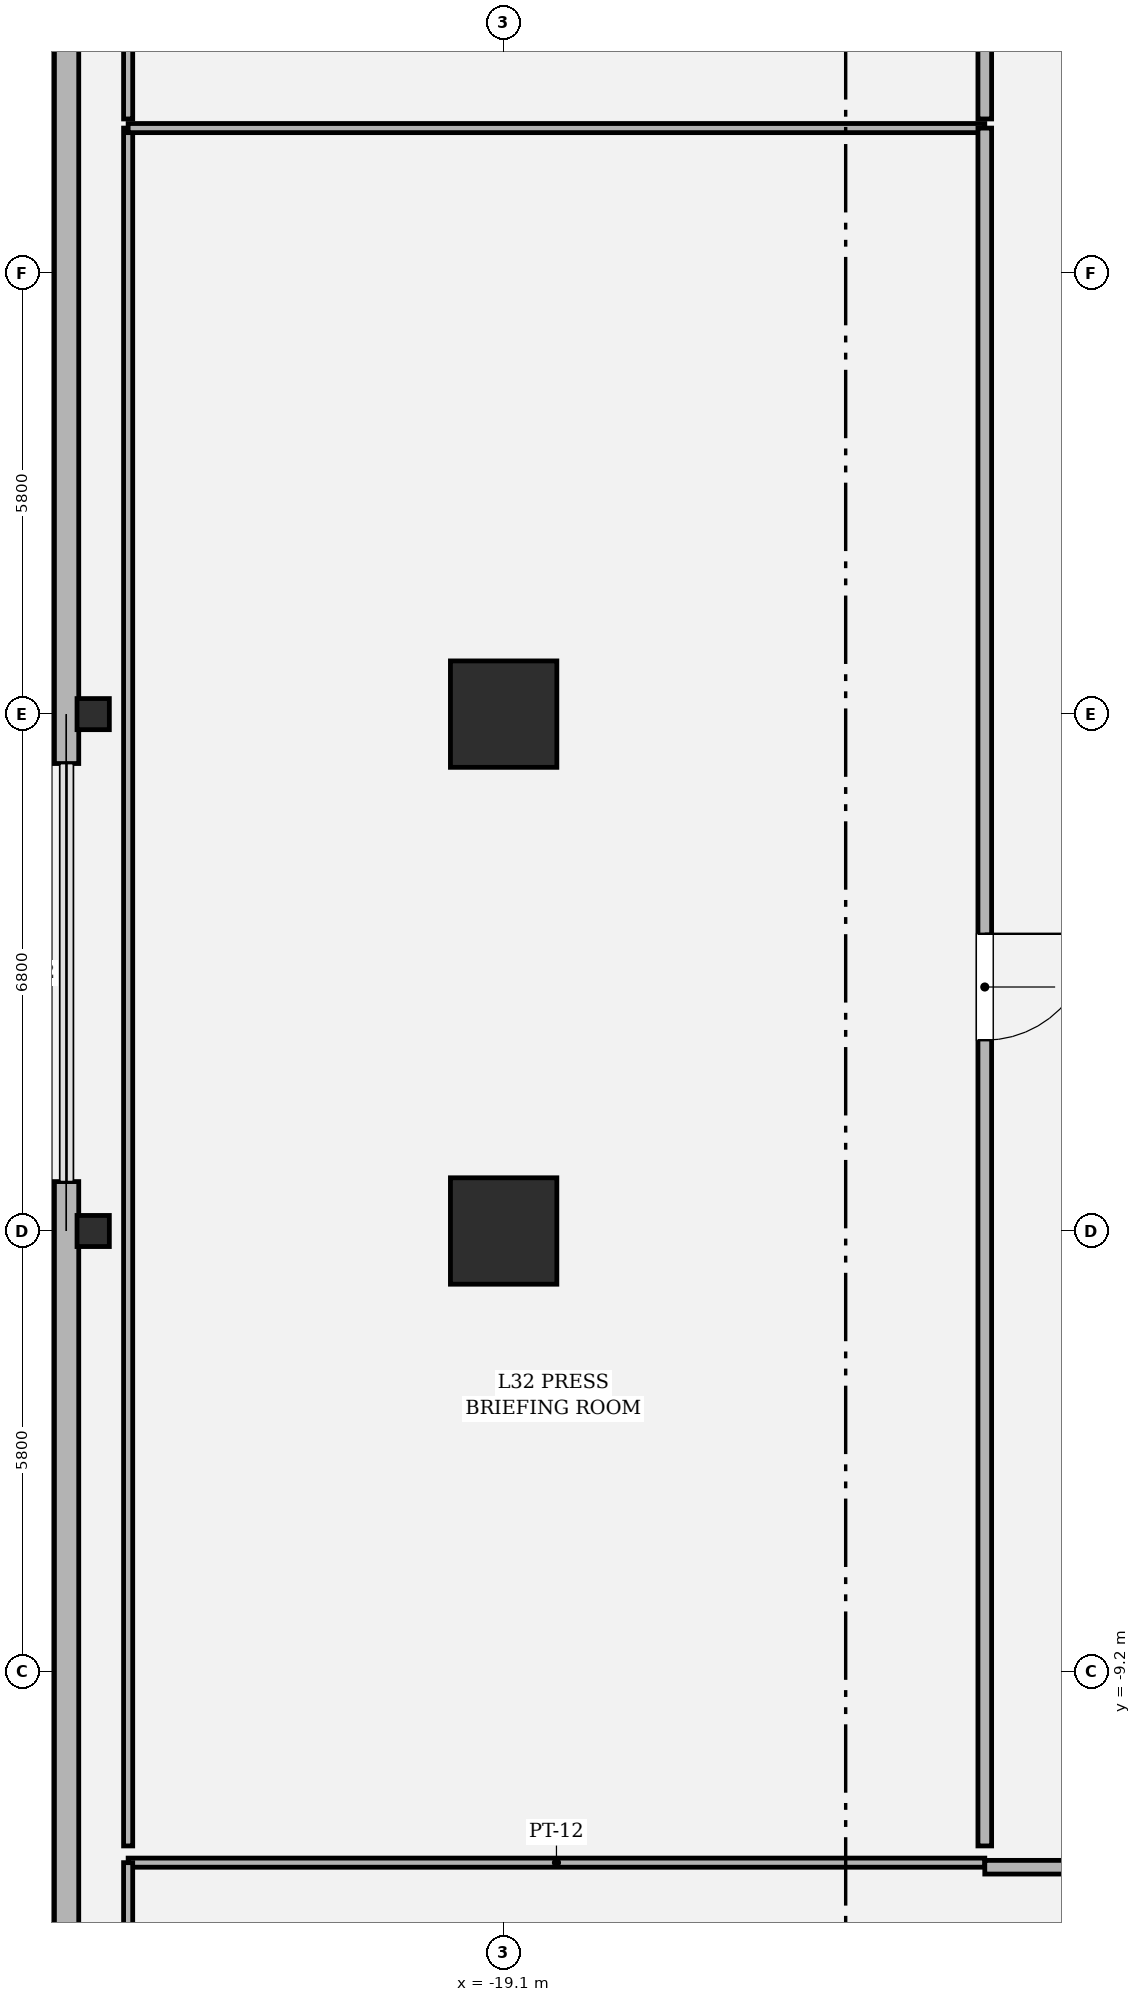
"""IFC4 building model, lengths in metres.
Left out: names, types, materials, properties, quantities, classifications, styles, units other than length and angle.
Written with IfcOpenShell. Run it as: python <this file> out.ifc"""

import sys

from ifc_helpers import new_model, si_unit, direction, frame, frame_2d, origin, origin_2d, place, context, subcontext, project, spatial, rectangle, hollow_rectangle, i_section, extrude, element, fill, save


model = new_model("IFC4")
c1 = context("Model", 3, precision=1e-05, world=origin(), true_north=direction((0.0, 1.0)))
c2 = subcontext(c1, "Body", "Model", "MODEL_VIEW")
j1 = project(units=[si_unit("LENGTHUNIT", "METRE"), si_unit("PLANEANGLEUNIT", "RADIAN")], contexts=[c1])
p1 = place(None, origin())
s1 = spatial("IfcSite", under=j1, at=p1, CompositionType="ELEMENT")
p2 = place(p1, origin())
s2 = spatial("IfcBuilding", under=s1, at=p2, CompositionType="ELEMENT")
p3 = place(p2, frame((0.0, 0.0, 139.8)))
s3 = spatial("IfcBuildingStorey", under=s2, at=p3, CompositionType="ELEMENT", Elevation=139.8)
for number, where, z_axis, x_axis in (
    (1, (-19.1, 3.4, 0.0), (0.0, 0.0, 1.0), (1.0, 0.0, 0.0)),
    (2, (-19.1, -3.4, 0.0), (0.0, 0.0, 1.0), (1.0, 0.0, 0.0)),
):
    element("IfcColumn", number, at=place(p3, frame(where, z_axis=z_axis, x_axis=x_axis)), inside=s3, PredefinedType="COLUMN", context=c2, shape_type="SweptSolid", body=[
        extrude(hollow_rectangle(XDim=1.4, YDim=1.4, WallThickness=0.042, at=origin_2d()), origin(), (0.0, 0.0, 1.0), 4.05),
    ])
for number, where, z_axis, x_axis in (
    (3, (-24.5, -3.4, 0.0), (0.0, 0.0, 1.0), (0.0, 1.0, 0.0)),
    (4, (-24.5, 3.4, 0.0), (0.0, 0.0, 1.0), (0.0, 1.0, 0.0)),
):
    element("IfcColumn", number, at=place(p3, frame(where, z_axis=z_axis, x_axis=x_axis)), inside=s3, PredefinedType="COLUMN", context=c2, shape_type="SweptSolid", body=[
        extrude(i_section(OverallWidth=0.409, OverallDepth=0.425, WebThickness=0.032, FlangeThickness=0.052, FilletRadius=0.018, at=origin_2d()), origin(), (0.0, 0.0, 1.0), 4.048),
    ])
p4 = place(p3, frame((-24.85, 20.237, 0.0), z_axis=(0.0, 0.0, 1.0), x_axis=(0.0, -1.0, 0.0)))
e5 = element("IfcWall", 5, at=p4, inside=s3, PredefinedType="SOLIDWALL", context=c2, shape_type="SweptSolid", body=[
    extrude(rectangle(XDim=17.487, YDim=0.32, at=frame_2d((8.743, 0.0))), origin(), (0.0, 0.0, 1.0), 2.544),
])
p5 = place(p3, frame((-24.85, -2.75, 0.0), z_axis=(0.0, 0.0, 1.0), x_axis=(0.0, -1.0, 0.0)))
e6 = element("IfcWall", 6, at=p5, inside=s3, PredefinedType="SOLIDWALL", context=c2, shape_type="SweptSolid", body=[
    extrude(rectangle(XDim=12.687, YDim=0.32, at=frame_2d((6.344, 0.0))), origin(), (0.0, 0.0, 1.0), 2.544),
])
p6 = place(p3, frame((-24.04, -11.71, 0.0), z_axis=(0.0, 0.0, 1.0), x_axis=(1.0, 0.0, 0.0)))
e7 = element("IfcWall", 7, at=p6, inside=s3, PredefinedType="PARTITIONING", context=c2, shape_type="SweptSolid", body=[
    extrude(rectangle(XDim=11.27, YDim=0.12, at=frame_2d((5.635, 0.0))), origin(), (0.0, 0.0, 1.0), 3.174),
])
p7 = place(p3, frame((-12.77, -11.77, 0.0), z_axis=(0.0, 0.0, 1.0), x_axis=(1.0, 0.0, 0.0)))
e8 = element("IfcWall", 8, at=p7, inside=s3, PredefinedType="PARTITIONING", context=c2, shape_type="SweptSolid", body=[
    extrude(rectangle(XDim=13.088, YDim=0.18, at=frame_2d((6.544, 0.0))), origin(), (0.0, 0.0, 1.0), 3.174),
])
p8 = place(p7, frame((6.019, 0.0, 0.0)))
e9 = element("IfcOpeningElement", 9, at=p8, cuts=e8, PredefinedType="OPENING", context=c2, shape_type="SweptSolid", body=[
    extrude(rectangle(XDim=1.05, YDim=2.2, at=frame_2d((0.525, 1.1))), frame((0.0, 0.1, 0.0), z_axis=(0.0, -1.0, 0.0), x_axis=(1.0, 0.0, 0.0)), (0.0, 0.0, 1.0), 0.2),
])
p9 = place(p3, frame((-24.04, -16.54, 0.0), z_axis=(0.0, 0.0, 1.0), x_axis=(0.0, 1.0, 0.0)))
e10 = element("IfcWall", 10, at=p9, inside=s3, PredefinedType="PARTITIONING", context=c2, shape_type="SweptSolid", body=[
    extrude(rectangle(XDim=4.83, YDim=0.12, at=frame_2d((2.415, 0.0))), origin(), (0.0, 0.0, 1.0), 3.83),
])
p10 = place(p3, frame((-24.04, -11.49, 0.0), z_axis=(0.0, 0.0, 1.0), x_axis=(0.0, 1.0, 0.0)))
e11 = element("IfcWall", 11, at=p10, inside=s3, PredefinedType="PARTITIONING", context=c2, shape_type="SweptSolid", body=[
    extrude(rectangle(XDim=22.6, YDim=0.12, at=frame_2d((11.3, 0.0))), origin(), (0.0, 0.0, 1.0), 2.504),
])
p11 = place(p3, frame((-24.04, 11.11, 0.0), z_axis=(0.0, 0.0, 1.0), x_axis=(1.0, 0.0, 0.0)))
e12 = element("IfcWall", 12, at=p11, inside=s3, PredefinedType="PARTITIONING", context=c2, shape_type="SweptSolid", body=[
    extrude(rectangle(XDim=11.27, YDim=0.12, at=frame_2d((5.635, 0.0))), origin(), (0.0, 0.0, 1.0), 3.174),
])
p12 = place(p3, frame((-12.77, 11.11, 0.0), z_axis=(0.0, 0.0, 1.0), x_axis=(0.0, -1.0, 0.0)))
e13 = element("IfcWall", 13, at=p12, inside=s3, PredefinedType="PARTITIONING", context=c2, shape_type="SweptSolid", body=[
    extrude(rectangle(XDim=22.6, YDim=0.18, at=frame_2d((11.3, 0.0))), origin(), (0.0, 0.0, 1.0), 3.174),
])
p13 = place(p12, frame((10.6, 0.0, 0.0)))
e14 = element("IfcOpeningElement", 14, at=p13, cuts=e13, PredefinedType="OPENING", context=c2, shape_type="SweptSolid", body=[
    extrude(rectangle(XDim=1.4, YDim=2.25, at=frame_2d((0.7, 1.125))), frame((0.0, 0.1, 0.0), z_axis=(0.0, -1.0, 0.0), x_axis=(1.0, 0.0, 0.0)), (0.0, 0.0, 1.0), 0.2),
])
p14 = place(p3, frame((-12.77, 22.44, 0.0), z_axis=(0.0, 0.0, 1.0), x_axis=(0.0, -1.0, 0.0)))
e15 = element("IfcWall", 15, at=p14, inside=s3, PredefinedType="PARTITIONING", context=c2, shape_type="SweptSolid", body=[
    extrude(rectangle(XDim=11.21, YDim=0.18, at=frame_2d((5.605, 0.0))), origin(), (0.0, 0.0, 1.0), 3.174),
])
p15 = place(p14, frame((5.08, 0.0, 0.0)))
e16 = element("IfcOpeningElement", 16, at=p15, cuts=e15, PredefinedType="OPENING", context=c2, shape_type="SweptSolid", body=[
    extrude(rectangle(XDim=1.05, YDim=2.2, at=frame_2d((0.525, 1.1))), frame((0.0, 0.1, 0.0), z_axis=(0.0, -1.0, 0.0), x_axis=(1.0, 0.0, 0.0)), (0.0, 0.0, 1.0), 0.2),
])
p16 = place(p3, frame((-24.04, 11.23, 0.0), z_axis=(0.0, 0.0, 1.0), x_axis=(0.0, 1.0, 0.0)))
e17 = element("IfcWall", 17, at=p16, inside=s3, PredefinedType="PARTITIONING", context=c2, shape_type="SweptSolid", body=[
    extrude(rectangle(XDim=10.917, YDim=0.12, at=frame_2d((5.459, 0.0))), origin(), (0.0, 0.0, 1.0), 2.504),
])
p17 = place(p13, origin())
e18 = element("IfcDoor", 18, at=p17, inside=s3, OperationType="SINGLE_SWING_LEFT", PredefinedType="DOOR", context=c2, shape_type="SweptSolid", body=[
    extrude(rectangle(XDim=1.4, YDim=2.25, at=frame_2d((0.7, 1.125))), frame((0.0, 0.025, 0.0), z_axis=(0.0, -1.0, 0.0), x_axis=(1.0, 0.0, 0.0)), (0.0, 0.0, 1.0), 0.05),
])
fill(e14, e18)
save(model, sys.argv[1])
